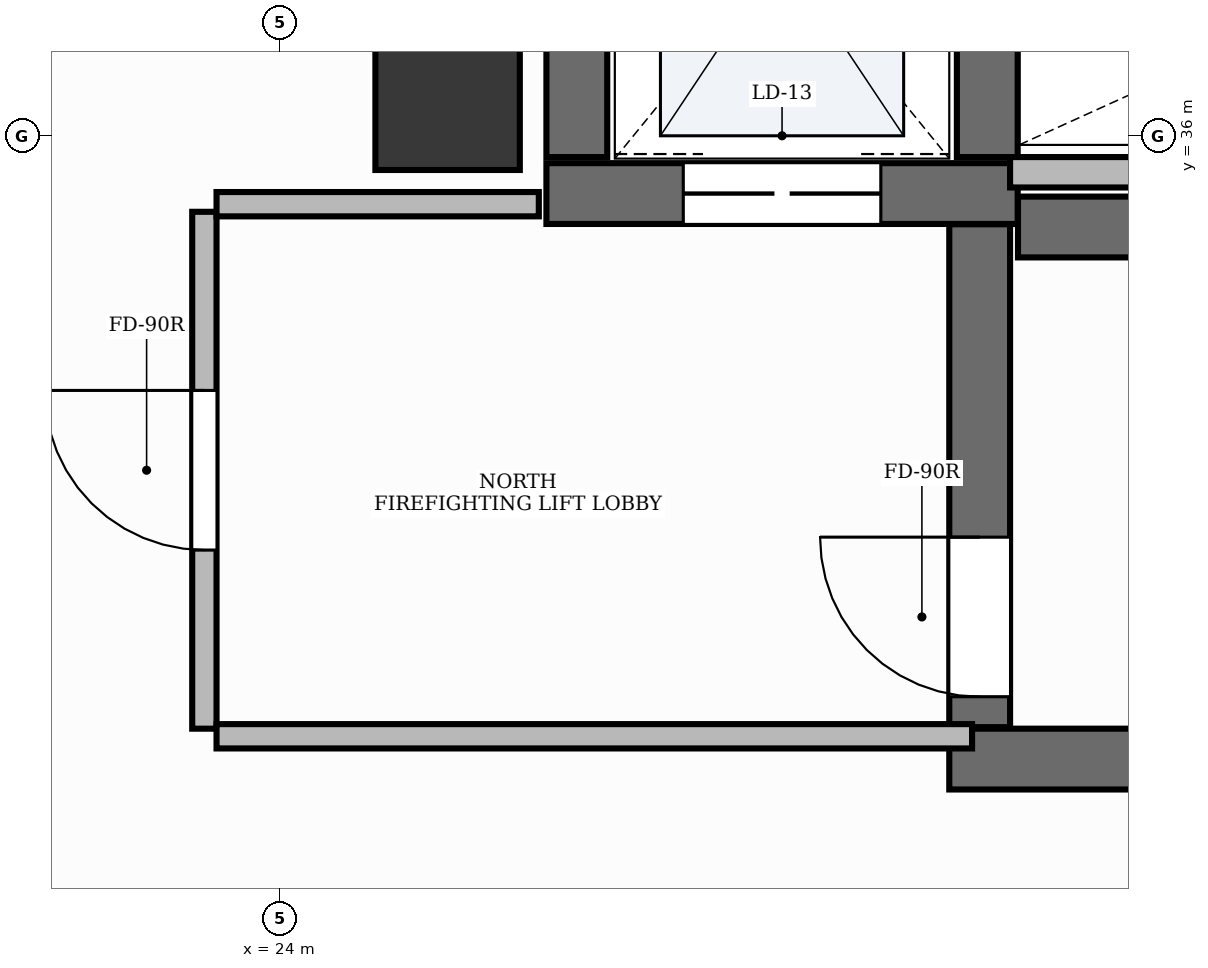
"""IFC4 building model, lengths in metres.
Left out: names, types, materials, properties, quantities, classifications, styles, units other than length and angle.
Written with IfcOpenShell. Run it as: python <this file> out.ifc"""

import sys

from ifc_helpers import new_model, si_unit, direction, frame, frame_2d, origin, origin_2d, place, context, subcontext, project, spatial, rectangle, extrude, element, fill, save


model = new_model("IFC4")
c1 = context("Model", 3, precision=1e-05, world=origin(), true_north=direction((0.0, 1.0)))
c2 = subcontext(c1, "Body", "Model", "MODEL_VIEW")
j1 = project(units=[si_unit("LENGTHUNIT", "METRE"), si_unit("PLANEANGLEUNIT", "RADIAN")], contexts=[c1])
p1 = place(None, origin())
s1 = spatial("IfcSite", under=j1, at=p1, CompositionType="ELEMENT")
p2 = place(p1, origin())
s2 = spatial("IfcBuilding", under=s1, at=p2, CompositionType="ELEMENT")
p3 = place(p2, frame((0.0, 0.0, 213.0)))
s3 = spatial("IfcBuildingStorey", under=s2, at=p3, CompositionType="ELEMENT", Elevation=213.0)
p4 = place(p3, frame((28.852, 35.4, 0.0), z_axis=(0.0, 0.0, 1.0), x_axis=(1.0, 0.0, 0.0)))
e1 = element("IfcWall", 1, at=p4, inside=s3, PredefinedType="SHEAR", context=c2, shape_type="SweptSolid", body=[
    extrude(rectangle(XDim=8.198, YDim=0.4, at=frame_2d((4.099, 0.0))), origin(), (0.0, 0.0, 1.0), 5.1),
])
p5 = place(p3, frame((28.4, 31.9, 0.0), z_axis=(0.0, 0.0, 1.0), x_axis=(1.0, 0.0, 0.0)))
e2 = element("IfcWall", 2, at=p5, inside=s3, PredefinedType="SHEAR", context=c2, shape_type="SweptSolid", body=[
    extrude(rectangle(XDim=8.65, YDim=0.4, at=frame_2d((4.325, 0.0))), origin(), (0.0, 0.0, 1.0), 5.1),
])
p6 = place(p3, frame((28.6, 32.11, 0.0), z_axis=(0.0, 0.0, 1.0), x_axis=(0.0, 1.0, 0.0)))
e3 = element("IfcWall", 3, at=p6, inside=s3, PredefinedType="SHEAR", context=c2, shape_type="SweptSolid", body=[
    extrude(rectangle(XDim=3.308, YDim=0.4, at=frame_2d((1.654, 0.0))), origin(), (0.0, 0.0, 1.0), 5.1),
])
p7 = place(p6, frame((0.2, 0.0, 0.0)))
e4 = element("IfcOpeningElement", 4, at=p7, cuts=e3, PredefinedType="OPENING", context=c2, shape_type="SweptSolid", body=[
    extrude(rectangle(XDim=1.05, YDim=2.15, at=frame_2d((0.525, 1.075))), frame((0.0, 0.215, 0.0), z_axis=(0.0, -1.0, 0.0), x_axis=(1.0, 0.0, 0.0)), (0.0, 0.0, 1.0), 0.43),
])
p8 = place(p3, frame((25.75, 35.62, 0.0), z_axis=(0.0, 0.0, 1.0), x_axis=(1.0, 0.0, 0.0)))
e5 = element("IfcWall", 5, at=p8, inside=s3, PredefinedType="SHEAR", context=c2, shape_type="SweptSolid", body=[
    extrude(rectangle(XDim=3.1, YDim=0.4, at=frame_2d((1.55, 0.0))), origin(), (0.0, 0.0, 1.0), 5.1),
])
p9 = place(p8, frame((0.9, 0.0, 0.0)))
e6 = element("IfcOpeningElement", 6, at=p9, cuts=e5, PredefinedType="OPENING", context=c2, shape_type="SweptSolid", body=[
    extrude(rectangle(XDim=1.3, YDim=2.2, at=frame_2d((0.65, 1.1))), frame((0.0, 0.215, 0.0), z_axis=(0.0, -1.0, 0.0), x_axis=(1.0, 0.0, 0.0)), (0.0, 0.0, 1.0), 0.43),
])
for number, where, z_axis, x_axis in (
    (7, (25.95, 35.86, 0.0), (0.0, 0.0, 1.0), (0.0, 1.0, 0.0)),
    (8, (28.65, 35.86, 0.0), (0.0, 0.0, 1.0), (0.0, 1.0, 0.0)),
):
    element("IfcWall", number, at=place(p3, frame(where, z_axis=z_axis, x_axis=x_axis)), inside=s3, PredefinedType="SHEAR", context=c2, shape_type="SweptSolid", body=[
        extrude(rectangle(XDim=2.7, YDim=0.4, at=frame_2d((1.35, 0.0))), origin(), (0.0, 0.0, 1.0), 5.1),
    ])
p10 = place(p3, frame((25.1, 36.25, -0.0), z_axis=(0.0, 0.0, 1.0), x_axis=(1.0, 0.0, 0.0)))
e9 = element("IfcColumn", 9, at=p10, inside=s3, PredefinedType="PILASTER", context=c2, shape_type="SweptSolid", body=[
    extrude(rectangle(XDim=0.95, YDim=0.95, at=origin_2d()), origin(), (0.0, 0.0, 1.0), 5.101),
])
p11 = place(p3, frame((28.8, 35.76, 0.0), z_axis=(0.0, 0.0, 1.0), x_axis=(1.0, 0.0, 0.0)))
e10 = element("IfcWall", 10, at=p11, inside=s3, PredefinedType="PARTITIONING", context=c2, shape_type="SweptSolid", body=[
    extrude(rectangle(XDim=4.57, YDim=0.2, at=frame_2d((2.285, 0.0))), origin(), (0.0, 0.0, 1.0), 3.41),
])
p12 = place(p3, frame((23.5, 32.1, 0.0), z_axis=(0.0, 0.0, 1.0), x_axis=(0.0, 1.0, 0.0)))
e11 = element("IfcWall", 11, at=p12, inside=s3, PredefinedType="PARTITIONING", context=c2, shape_type="SweptSolid", body=[
    extrude(rectangle(XDim=3.4, YDim=0.16, at=frame_2d((1.7, 0.0))), origin(), (0.0, 0.0, 1.0), 3.41),
])
p13 = place(p12, frame((1.175, 0.0, 0.0)))
e12 = element("IfcOpeningElement", 12, at=p13, cuts=e11, PredefinedType="OPENING", context=c2, shape_type="SweptSolid", body=[
    extrude(rectangle(XDim=1.05, YDim=2.15, at=frame_2d((0.525, 1.075))), frame((0.0, 0.095, 0.0), z_axis=(0.0, -1.0, 0.0), x_axis=(1.0, 0.0, 0.0)), (0.0, 0.0, 1.0), 0.19),
])
p14 = place(p3, frame((23.58, 32.05, 0.0), z_axis=(0.0, 0.0, 1.0), x_axis=(1.0, 0.0, 0.0)))
e13 = element("IfcWall", 13, at=p14, inside=s3, PredefinedType="PARTITIONING", context=c2, shape_type="SweptSolid", body=[
    extrude(rectangle(XDim=4.97, YDim=0.16, at=frame_2d((2.485, 0.0))), origin(), (0.0, 0.0, 1.0), 3.41),
])
p15 = place(p3, frame((23.58, 35.55, 0.0), z_axis=(0.0, 0.0, 1.0), x_axis=(1.0, 0.0, 0.0)))
e14 = element("IfcWall", 14, at=p15, inside=s3, PredefinedType="PARTITIONING", context=c2, shape_type="SweptSolid", body=[
    extrude(rectangle(XDim=2.12, YDim=0.16, at=frame_2d((1.06, 0.0))), origin(), (0.0, 0.0, 1.0), 3.41),
])
p16 = place(p7, origin())
e15 = element("IfcDoor", 15, at=p16, inside=s3, OperationType="SINGLE_SWING_RIGHT", PredefinedType="DOOR", context=c2, shape_type="SweptSolid", body=[
    extrude(rectangle(XDim=1.05, YDim=2.15, at=frame_2d((0.525, 1.075))), frame((0.0, 0.025, 0.0), z_axis=(0.0, -1.0, 0.0), x_axis=(1.0, 0.0, 0.0)), (0.0, 0.0, 1.0), 0.05),
])
fill(e4, e15)
p17 = place(p9, origin())
e16 = element("IfcDoor", 16, at=p17, inside=s3, OperationType="DOUBLE_DOOR_SLIDING", PredefinedType="DOOR", context=c2, shape_type="SweptSolid", body=[
    extrude(rectangle(XDim=1.3, YDim=2.2, at=frame_2d((0.65, 1.1))), frame((0.0, 0.025, 0.0), z_axis=(0.0, -1.0, 0.0), x_axis=(1.0, 0.0, 0.0)), (0.0, 0.0, 1.0), 0.05),
])
fill(e6, e16)
p18 = place(p13, origin())
e17 = element("IfcDoor", 17, at=p18, inside=s3, OperationType="SINGLE_SWING_RIGHT", PredefinedType="DOOR", context=c2, shape_type="SweptSolid", body=[
    extrude(rectangle(XDim=1.05, YDim=2.15, at=frame_2d((0.525, 1.075))), frame((0.0, 0.025, 0.0), z_axis=(0.0, -1.0, 0.0), x_axis=(1.0, 0.0, 0.0)), (0.0, 0.0, 1.0), 0.05),
])
fill(e12, e17)
save(model, sys.argv[1])
